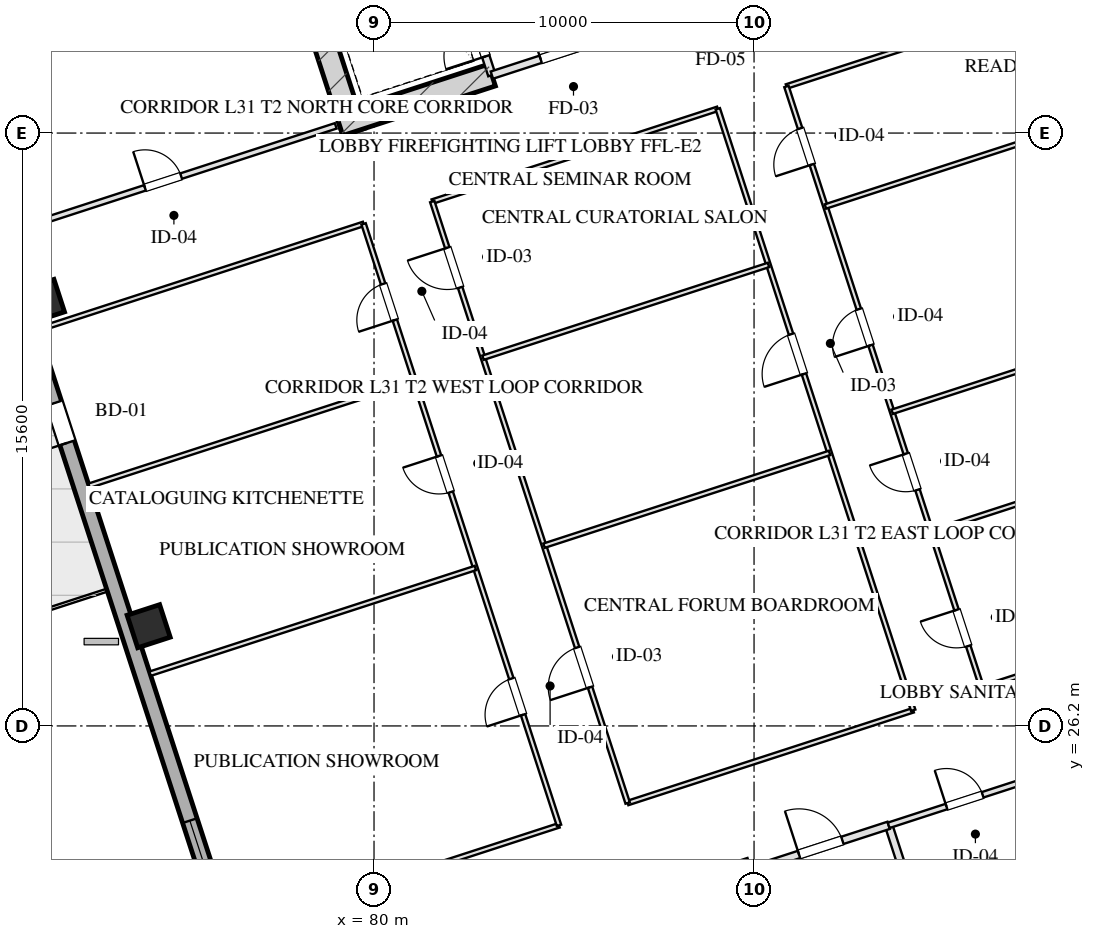
"""IFC4 building model, lengths in metres.
Left out: names, types, materials, properties, quantities, classifications, styles, units other than length and angle.
Written with IfcOpenShell. Run it as: python <this file> out.ifc"""

import sys

from ifc_helpers import new_model, si_unit, direction, frame, frame_2d, origin, origin_2d, place, context, subcontext, project, spatial, rectangle, hollow_rectangle, extrude, element, fill, save


model = new_model("IFC4")
c1 = context("Model", 3, precision=1e-05, world=origin(), true_north=direction((0.0, 1.0)))
c2 = subcontext(c1, "Body", "Model", "MODEL_VIEW")
j1 = project(units=[si_unit("LENGTHUNIT", "METRE"), si_unit("PLANEANGLEUNIT", "RADIAN")], contexts=[c1])
p1 = place(None, origin())
s1 = spatial("IfcSite", under=j1, at=p1, CompositionType="ELEMENT")
p2 = place(p1, origin())
s2 = spatial("IfcBuilding", under=s1, at=p2, CompositionType="ELEMENT")
p3 = place(p2, frame((0.0, 0.0, 120.75)))
s3 = spatial("IfcBuildingStorey", under=s2, at=p3, CompositionType="ELEMENT", Elevation=120.75)
p4 = place(p3, frame((85.886, 21.097, 0.0), z_axis=(0.0, 0.0, 1.0), x_axis=(0.951068073652, 0.308981422225, 0.0)))
e1 = element("IfcWall", 1, at=p4, inside=s3, PredefinedType="SHEAR", context=c2, shape_type="SweptSolid", body=[
    extrude(rectangle(XDim=4.22, YDim=0.6, at=frame_2d((2.11, 0.0))), origin(), (0.0, 0.0, 1.0), 3.45),
])
p5 = place(p3, frame((79.466, 41.828, 0.0), z_axis=(0.0, 0.0, 1.0), x_axis=(-0.309041232772, 0.951048640421, 0.0)))
e2 = element("IfcWall", 2, at=p5, inside=s3, PredefinedType="SHEAR", context=c2, shape_type="SweptSolid", body=[
    extrude(rectangle(XDim=9.48, YDim=0.6, at=frame_2d((4.74, 0.0))), origin(), (0.0, 0.0, 1.0), 3.45),
])
p6 = place(p3, frame((79.087, 42.021, 0.0), z_axis=(0.0, 0.0, 1.0), x_axis=(0.951062550203, 0.3089984233, 0.0)))
e3 = element("IfcWall", 3, at=p6, inside=s3, PredefinedType="SHEAR", context=c2, shape_type="SweptSolid", body=[
    extrude(rectangle(XDim=4.22, YDim=0.6, at=frame_2d((2.11, 0.0))), origin(), (0.0, 0.0, 1.0), 3.45),
])
for number, where, z_axis, x_axis in (
    (4, (74.07, 28.824, 0.0), (0.0, 0.0, 1.0), (0.951, 0.309, 0.0)),
    (5, (71.289, 37.384, 0.0), (0.0, 0.0, 1.0), (0.951, 0.309, 0.0)),
):
    element("IfcColumn", number, at=place(p3, frame(where, z_axis=z_axis, x_axis=x_axis)), inside=s3, PredefinedType="COLUMN", context=c2, shape_type="SweptSolid", body=[
        extrude(hollow_rectangle(XDim=0.9, YDim=0.9, WallThickness=0.032, at=origin_2d()), origin(), (0.0, 0.0, 1.0), 3.451),
    ])
p7 = place(p3, frame((80.716, 6.59, 0.0), z_axis=(0.0, 0.0, 1.0), x_axis=(-0.309017542002, 0.95105633836, 0.0)))
e6 = element("IfcWall", 6, at=p7, inside=s3, PredefinedType="SOLIDWALL", context=c2, shape_type="SweptSolid", body=[
    extrude(rectangle(XDim=46.4, YDim=0.4, at=frame_2d((23.2, 0.0))), origin(), (0.0, 0.0, 1.0), 2.61),
])
p8 = place(p7, frame((15.6, 0.0, 0.75)))
e7 = element("IfcOpeningElement", 7, at=p8, cuts=e6, PredefinedType="OPENING", context=c2, shape_type="SweptSolid", body=[
    extrude(rectangle(XDim=2.4, YDim=1.46, at=frame_2d((1.2, 0.73))), frame((0.0, 0.21, 0.0), z_axis=(0.0, -1.0, 0.0), x_axis=(1.0, 0.0, 0.0)), (0.0, 0.0, 1.0), 0.42),
])
p9 = place(p7, frame((28.45, 0.0, 0.0)))
e8 = element("IfcOpeningElement", 8, at=p9, cuts=e6, PredefinedType="OPENING", context=c2, shape_type="SweptSolid", body=[
    extrude(rectangle(XDim=1.1, YDim=2.15, at=frame_2d((0.55, 1.075))), frame((0.0, 0.21, 0.0), z_axis=(0.0, -1.0, 0.0), x_axis=(1.0, 0.0, 0.0)), (0.0, 0.0, 1.0), 0.42),
])
p10 = place(p3, frame((93.542, 23.585, 0.0), z_axis=(0.0, 0.0, 1.0), x_axis=(0.309042196757, -0.951048327176, 0.0)))
e9 = element("IfcWall", 9, at=p10, inside=s3, PredefinedType="PARTITIONING", context=c2, shape_type="SweptSolid", body=[
    extrude(rectangle(XDim=8.43, YDim=0.2, at=frame_2d((4.215, 0.0))), origin(), (0.0, 0.0, 1.0), 3.175),
])
p11 = place(p3, frame((89.899, 22.401, 0.0), z_axis=(0.0, 0.0, 1.0), x_axis=(0.951046716504, 0.309047153403, 0.0)))
e10 = element("IfcWall", 10, at=p11, inside=s3, PredefinedType="PARTITIONING", context=c2, shape_type="SweptSolid", body=[
    extrude(rectangle(XDim=3.83, YDim=0.2, at=frame_2d((1.915, 0.0))), origin(), (0.0, 0.0, 1.0), 3.175),
])
p12 = place(p11, frame((1.35, 0.0, 0.0)))
e11 = element("IfcOpeningElement", 11, at=p12, cuts=e10, PredefinedType="OPENING", context=c2, shape_type="SweptSolid", body=[
    extrude(rectangle(XDim=1.2, YDim=2.05, at=frame_2d((0.6, 1.025))), frame((0.0, 0.11, 0.0), z_axis=(0.0, -1.0, 0.0), x_axis=(1.0, 0.0, 0.0)), (0.0, 0.0, 1.0), 0.22),
])
p13 = place(p3, frame((93.542, 23.585, 0.0), z_axis=(0.0, 0.0, 1.0), x_axis=(0.951063829732, 0.308994485023, 0.0)))
e12 = element("IfcWall", 12, at=p13, inside=s3, PredefinedType="PARTITIONING", context=c2, shape_type="SweptSolid", body=[
    extrude(rectangle(XDim=4.4, YDim=0.15, at=frame_2d((2.2, 0.0))), origin(), (0.0, 0.0, 1.0), 3.175),
])
p14 = place(p13, frame((1.6, 0.0, 0.0)))
e13 = element("IfcOpeningElement", 13, at=p14, cuts=e12, PredefinedType="OPENING", context=c2, shape_type="SweptSolid", body=[
    extrude(rectangle(XDim=1.0, YDim=2.05, at=frame_2d((0.5, 1.025))), frame((0.0, 0.085, 0.0), z_axis=(0.0, -1.0, 0.0), x_axis=(1.0, 0.0, 0.0)), (0.0, 0.0, 1.0), 0.17),
])
p15 = place(p3, frame((83.101, 43.324, 0.0), z_axis=(0.0, 0.0, 1.0), x_axis=(-0.309048298632, 0.951046344356, 0.0)))
e14 = element("IfcWall", 14, at=p15, inside=s3, PredefinedType="PARTITIONING", context=c2, shape_type="SweptSolid", body=[
    extrude(rectangle(XDim=1.9, YDim=0.2, at=frame_2d((0.95, 0.0))), origin(), (0.0, 0.0, 1.0), 3.175),
])
p16 = place(p15, frame((0.52, 0.0, 0.0)))
e15 = element("IfcOpeningElement", 15, at=p16, cuts=e14, PredefinedType="OPENING", context=c2, shape_type="SweptSolid", body=[
    extrude(rectangle(XDim=1.1, YDim=2.05, at=frame_2d((0.55, 1.025))), frame((0.0, 0.11, 0.0), z_axis=(0.0, -1.0, 0.0), x_axis=(1.0, 0.0, 0.0)), (0.0, 0.0, 1.0), 0.22),
])
p17 = place(p3, frame((83.101, 43.324, 0.0), z_axis=(0.0, 0.0, 1.0), x_axis=(0.951052804469, 0.309028417967, 0.0)))
e16 = element("IfcWall", 16, at=p17, inside=s3, PredefinedType="PARTITIONING", context=c2, shape_type="SweptSolid", body=[
    extrude(rectangle(XDim=3.83, YDim=0.2, at=frame_2d((1.915, 0.0))), origin(), (0.0, 0.0, 1.0), 3.175),
])
p18 = place(p17, frame((1.35, 0.0, 0.0)))
e17 = element("IfcOpeningElement", 17, at=p18, cuts=e16, PredefinedType="OPENING", context=c2, shape_type="SweptSolid", body=[
    extrude(rectangle(XDim=1.2, YDim=2.05, at=frame_2d((0.6, 1.025))), frame((0.0, 0.11, 0.0), z_axis=(0.0, -1.0, 0.0), x_axis=(1.0, 0.0, 0.0)), (0.0, 0.0, 1.0), 0.22),
])
p19 = place(p3, frame((70.338, 39.177, 0.0), z_axis=(0.0, 0.0, 1.0), x_axis=(0.951059695568, 0.309007209409, 0.0)))
e18 = element("IfcWall", 18, at=p19, inside=s3, PredefinedType="PARTITIONING", context=c2, shape_type="SweptSolid", body=[
    extrude(rectangle(XDim=9.1, YDim=0.15, at=frame_2d((4.55, 0.0))), origin(), (0.0, 0.0, 1.0), 3.175),
])
p20 = place(p19, frame((3.822, 0.0, 0.0)))
e19 = element("IfcOpeningElement", 19, at=p20, cuts=e18, PredefinedType="OPENING", context=c2, shape_type="SweptSolid", body=[
    extrude(rectangle(XDim=1.0, YDim=2.05, at=frame_2d((0.5, 1.025))), frame((0.0, 0.085, 0.0), z_axis=(0.0, -1.0, 0.0), x_axis=(1.0, 0.0, 0.0)), (0.0, 0.0, 1.0), 0.17),
])
p21 = place(p3, frame((76.308, 20.803, 0.0), z_axis=(0.0, 0.0, 1.0), x_axis=(0.951054001411, 0.309024734286, 0.0)))
e20 = element("IfcWall", 20, at=p21, inside=s3, PredefinedType="PARTITIONING", context=c2, shape_type="SweptSolid", body=[
    extrude(rectangle(XDim=9.0, YDim=0.12, at=frame_2d((4.5, 0.0))), origin(), (0.0, 0.0, 1.0), 3.175),
])
p22 = place(p3, frame((86.675, 24.171, 0.0), z_axis=(0.0, 0.0, 1.0), x_axis=(0.951057231385, 0.309014793547, 0.0)))
e21 = element("IfcWall", 21, at=p22, inside=s3, PredefinedType="PARTITIONING", context=c2, shape_type="SweptSolid", body=[
    extrude(rectangle(XDim=7.9, YDim=0.12, at=frame_2d((3.95, 0.0))), origin(), (0.0, 0.0, 1.0), 3.175),
])
p23 = place(p3, frame((95.995, 27.2, 0.0), z_axis=(0.0, 0.0, 1.0), x_axis=(0.951057589409, 0.309013691651, 0.0)))
e22 = element("IfcWall", 22, at=p23, inside=s3, PredefinedType="PARTITIONING", context=c2, shape_type="SweptSolid", body=[
    extrude(rectangle(XDim=13.5, YDim=0.12, at=frame_2d((6.75, 0.0))), origin(), (0.0, 0.0, 1.0), 3.175),
])
p24 = place(p3, frame((71.166, 36.629, 0.0), z_axis=(0.0, 0.0, 1.0), x_axis=(0.951059383421, 0.309008170129, 0.0)))
e23 = element("IfcWall", 23, at=p24, inside=s3, PredefinedType="PARTITIONING", context=c2, shape_type="SweptSolid", body=[
    extrude(rectangle(XDim=9.0, YDim=0.12, at=frame_2d((4.5, 0.0))), origin(), (0.0, 0.0, 1.0), 3.175),
])
p25 = place(p3, frame((81.532, 39.997, 0.0), z_axis=(0.0, 0.0, 1.0), x_axis=(0.951048148493, 0.309042746635, 0.0)))
e24 = element("IfcWall", 24, at=p25, inside=s3, PredefinedType="PARTITIONING", context=c2, shape_type="SweptSolid", body=[
    extrude(rectangle(XDim=7.9, YDim=0.12, at=frame_2d((3.95, 0.0))), origin(), (0.0, 0.0, 1.0), 3.175),
])
p26 = place(p3, frame((90.853, 43.025, 0.0), z_axis=(0.0, 0.0, 1.0), x_axis=(0.951054001411, 0.309024734286, 0.0)))
e25 = element("IfcWall", 25, at=p26, inside=s3, PredefinedType="PARTITIONING", context=c2, shape_type="SweptSolid", body=[
    extrude(rectangle(XDim=13.5, YDim=0.12, at=frame_2d((6.75, 0.0))), origin(), (0.0, 0.0, 1.0), 3.175),
])
p27 = place(p3, frame((84.867, 23.584, 0.0), z_axis=(0.0, 0.0, 1.0), x_axis=(-0.309022042254, 0.951054876125, 0.0)))
e26 = element("IfcWall", 26, at=p27, inside=s3, PredefinedType="PARTITIONING", context=c2, shape_type="SweptSolid", body=[
    extrude(rectangle(XDim=16.64, YDim=0.12, at=frame_2d((8.32, 0.0))), origin(), (0.0, 0.0, 1.0), 3.175),
])
p28 = place(p27, frame((3.06, 0.0, 0.0)))
e27 = element("IfcOpeningElement", 27, at=p28, cuts=e26, PredefinedType="OPENING", context=c2, shape_type="SweptSolid", body=[
    extrude(rectangle(XDim=1.0, YDim=2.05, at=frame_2d((0.5, 1.025))), frame((0.0, 0.07, 0.0), z_axis=(0.0, -1.0, 0.0), x_axis=(1.0, 0.0, 0.0)), (0.0, 0.0, 1.0), 0.14),
])
p29 = place(p27, frame((9.22, 0.0, 0.0)))
e28 = element("IfcOpeningElement", 28, at=p29, cuts=e26, PredefinedType="OPENING", context=c2, shape_type="SweptSolid", body=[
    extrude(rectangle(XDim=1.0, YDim=2.05, at=frame_2d((0.5, 1.025))), frame((0.0, 0.07, 0.0), z_axis=(0.0, -1.0, 0.0), x_axis=(1.0, 0.0, 0.0)), (0.0, 0.0, 1.0), 0.14),
])
p30 = place(p27, frame((13.98, 0.0, 0.0)))
e29 = element("IfcOpeningElement", 29, at=p30, cuts=e26, PredefinedType="OPENING", context=c2, shape_type="SweptSolid", body=[
    extrude(rectangle(XDim=1.0, YDim=2.05, at=frame_2d((0.5, 1.025))), frame((0.0, 0.07, 0.0), z_axis=(0.0, -1.0, 0.0), x_axis=(1.0, 0.0, 0.0)), (0.0, 0.0, 1.0), 0.14),
])
p31 = place(p3, frame((86.675, 24.171, 0.0), z_axis=(0.0, 0.0, 1.0), x_axis=(-0.309022042254, 0.951054876125, 0.0)))
e30 = element("IfcWall", 30, at=p31, inside=s3, PredefinedType="PARTITIONING", context=c2, shape_type="SweptSolid", body=[
    extrude(rectangle(XDim=16.64, YDim=0.12, at=frame_2d((8.32, 0.0))), origin(), (0.0, 0.0, 1.0), 3.175),
])
p32 = place(p31, frame((3.204, 0.0, 0.0)))
e31 = element("IfcOpeningElement", 31, at=p32, cuts=e30, PredefinedType="OPENING", context=c2, shape_type="SweptSolid", body=[
    extrude(rectangle(XDim=1.1, YDim=2.05, at=frame_2d((0.55, 1.025))), frame((0.0, 0.07, 0.0), z_axis=(0.0, -1.0, 0.0), x_axis=(1.0, 0.0, 0.0)), (0.0, 0.0, 1.0), 0.14),
])
p33 = place(p31, frame((14.264, 0.0, 0.0)))
e32 = element("IfcOpeningElement", 32, at=p33, cuts=e30, PredefinedType="OPENING", context=c2, shape_type="SweptSolid", body=[
    extrude(rectangle(XDim=1.1, YDim=2.05, at=frame_2d((0.55, 1.025))), frame((0.0, 0.07, 0.0), z_axis=(0.0, -1.0, 0.0), x_axis=(1.0, 0.0, 0.0)), (0.0, 0.0, 1.0), 0.14),
])
p34 = place(p3, frame((94.188, 26.613, 0.0), z_axis=(0.0, 0.0, 1.0), x_axis=(-0.30901773025, 0.951056277195, 0.0)))
e33 = element("IfcWall", 33, at=p34, inside=s3, PredefinedType="PARTITIONING", context=c2, shape_type="SweptSolid", body=[
    extrude(rectangle(XDim=16.64, YDim=0.12, at=frame_2d((8.32, 0.0))), origin(), (0.0, 0.0, 1.0), 3.175),
])
p35 = place(p34, frame((9.304, 0.0, 0.0)))
e34 = element("IfcOpeningElement", 34, at=p35, cuts=e33, PredefinedType="OPENING", context=c2, shape_type="SweptSolid", body=[
    extrude(rectangle(XDim=1.1, YDim=2.05, at=frame_2d((0.55, 1.025))), frame((0.0, 0.07, 0.0), z_axis=(0.0, -1.0, 0.0), x_axis=(1.0, 0.0, 0.0)), (0.0, 0.0, 1.0), 0.14),
])
p36 = place(p3, frame((95.995, 27.2, 0.0), z_axis=(0.0, 0.0, 1.0), x_axis=(-0.309022042254, 0.951054876125, 0.0)))
e35 = element("IfcWall", 35, at=p36, inside=s3, PredefinedType="PARTITIONING", context=c2, shape_type="SweptSolid", body=[
    extrude(rectangle(XDim=16.64, YDim=0.12, at=frame_2d((8.32, 0.0))), origin(), (0.0, 0.0, 1.0), 3.175),
])
p37 = place(p36, frame((1.16, 0.0, 0.0)))
e36 = element("IfcOpeningElement", 36, at=p37, cuts=e35, PredefinedType="OPENING", context=c2, shape_type="SweptSolid", body=[
    extrude(rectangle(XDim=1.0, YDim=2.05, at=frame_2d((0.5, 1.025))), frame((0.0, 0.07, 0.0), z_axis=(0.0, -1.0, 0.0), x_axis=(1.0, 0.0, 0.0)), (0.0, 0.0, 1.0), 0.14),
])
p38 = place(p36, frame((5.48, 0.0, 0.0)))
e37 = element("IfcOpeningElement", 37, at=p38, cuts=e35, PredefinedType="OPENING", context=c2, shape_type="SweptSolid", body=[
    extrude(rectangle(XDim=1.0, YDim=2.05, at=frame_2d((0.5, 1.025))), frame((0.0, 0.07, 0.0), z_axis=(0.0, -1.0, 0.0), x_axis=(1.0, 0.0, 0.0)), (0.0, 0.0, 1.0), 0.14),
])
p39 = place(p36, frame((9.48, 0.0, 0.0)))
e38 = element("IfcOpeningElement", 38, at=p39, cuts=e35, PredefinedType="OPENING", context=c2, shape_type="SweptSolid", body=[
    extrude(rectangle(XDim=1.0, YDim=2.05, at=frame_2d((0.5, 1.025))), frame((0.0, 0.07, 0.0), z_axis=(0.0, -1.0, 0.0), x_axis=(1.0, 0.0, 0.0)), (0.0, 0.0, 1.0), 0.14),
])
p40 = place(p36, frame((14.48, 0.0, 0.0)))
e39 = element("IfcOpeningElement", 39, at=p40, cuts=e35, PredefinedType="OPENING", context=c2, shape_type="SweptSolid", body=[
    extrude(rectangle(XDim=1.0, YDim=2.05, at=frame_2d((0.5, 1.025))), frame((0.0, 0.07, 0.0), z_axis=(0.0, -1.0, 0.0), x_axis=(1.0, 0.0, 0.0)), (0.0, 0.0, 1.0), 0.14),
])
for number, where, z_axis, x_axis in (
    (40, (84.474, 30.943, 0.0), (0.0, 0.0, 1.0), (0.951, 0.309, 0.0)),
    (41, (82.867, 35.888, 0.0), (0.0, 0.0, 1.0), (0.951, 0.309, 0.0)),
):
    element("IfcWall", number, at=place(p3, frame(where, z_axis=z_axis, x_axis=x_axis)), inside=s3, PredefinedType="PARTITIONING", context=c2, shape_type="SweptSolid", body=[
        extrude(rectangle(XDim=7.9, YDim=0.12, at=frame_2d((3.95, 0.0))), origin(), (0.0, 0.0, 1.0), 3.175),
    ])
p41 = place(p3, frame((74.108, 27.574, 0.0), z_axis=(0.0, 0.0, 1.0), x_axis=(0.951054001411, 0.309024734286, 0.0)))
e42 = element("IfcWall", 42, at=p41, inside=s3, PredefinedType="PARTITIONING", context=c2, shape_type="SweptSolid", body=[
    extrude(rectangle(XDim=9.0, YDim=0.12, at=frame_2d((4.5, 0.0))), origin(), (0.0, 0.0, 1.0), 3.175),
])
p42 = place(p3, frame((72.501, 32.52, 0.0), z_axis=(0.0, 0.0, 1.0), x_axis=(0.951051410833, 0.309032706929, 0.0)))
e43 = element("IfcWall", 43, at=p42, inside=s3, PredefinedType="PARTITIONING", context=c2, shape_type="SweptSolid", body=[
    extrude(rectangle(XDim=9.0, YDim=0.12, at=frame_2d((4.5, 0.0))), origin(), (0.0, 0.0, 1.0), 3.175),
])
for number, where, z_axis, x_axis in (
    (44, (94.66, 31.308, 0.0), (0.0, 0.0, 1.0), (0.951, 0.309, 0.0)),
    (45, (93.634, 34.466, 0.0), (0.0, 0.0, 1.0), (0.951, 0.309, 0.0)),
):
    element("IfcWall", number, at=place(p3, frame(where, z_axis=z_axis, x_axis=x_axis)), inside=s3, PredefinedType="PARTITIONING", context=c2, shape_type="SweptSolid", body=[
        extrude(rectangle(XDim=13.5, YDim=0.12, at=frame_2d((6.75, 0.0))), origin(), (0.0, 0.0, 1.0), 3.175),
    ])
p43 = place(p3, frame((91.879, 39.868, 0.0), z_axis=(0.0, 0.0, 1.0), x_axis=(0.951054001411, 0.309024734286, 0.0)))
e46 = element("IfcWall", 46, at=p43, inside=s3, PredefinedType="PARTITIONING", context=c2, shape_type="SweptSolid", body=[
    extrude(rectangle(XDim=13.5, YDim=0.12, at=frame_2d((6.75, 0.0))), origin(), (0.0, 0.0, 1.0), 3.175),
])
p44 = place(p8, origin())
e47 = element("IfcWindow", 47, at=p44, inside=s3, PartitioningType="TRIPLE_PANEL_VERTICAL", PredefinedType="WINDOW", context=c2, shape_type="SweptSolid", body=[
    extrude(rectangle(XDim=2.4, YDim=1.46, at=frame_2d((1.2, 0.73))), frame((0.0, 0.03, 0.0), z_axis=(0.0, -1.0, 0.0), x_axis=(1.0, 0.0, 0.0)), (0.0, 0.0, 1.0), 0.06),
])
fill(e7, e47)
p45 = place(p9, origin())
e48 = element("IfcDoor", 48, at=p45, inside=s3, OperationType="SINGLE_SWING_LEFT", PredefinedType="DOOR", context=c2, shape_type="SweptSolid", body=[
    extrude(rectangle(XDim=1.1, YDim=2.15, at=frame_2d((0.55, 1.075))), frame((0.0, 0.025, 0.0), z_axis=(0.0, -1.0, 0.0), x_axis=(1.0, 0.0, 0.0)), (0.0, 0.0, 1.0), 0.05),
])
fill(e8, e48)
p46 = place(p12, origin())
e49 = element("IfcDoor", 49, at=p46, inside=s3, OperationType="SINGLE_SWING_LEFT", PredefinedType="DOOR", context=c2, shape_type="SweptSolid", body=[
    extrude(rectangle(XDim=1.2, YDim=2.05, at=frame_2d((0.6, 1.025))), frame((0.0, 0.025, 0.0), z_axis=(0.0, -1.0, 0.0), x_axis=(1.0, 0.0, 0.0)), (0.0, 0.0, 1.0), 0.05),
])
fill(e11, e49)
p47 = place(p14, origin())
e50 = element("IfcDoor", 50, at=p47, inside=s3, OperationType="SINGLE_SWING_LEFT", PredefinedType="DOOR", context=c2, shape_type="SweptSolid", body=[
    extrude(rectangle(XDim=1.0, YDim=2.05, at=frame_2d((0.5, 1.025))), frame((0.0, 0.025, 0.0), z_axis=(0.0, -1.0, 0.0), x_axis=(1.0, 0.0, 0.0)), (0.0, 0.0, 1.0), 0.05),
])
fill(e13, e50)
p48 = place(p16, origin())
e51 = element("IfcDoor", 51, at=p48, inside=s3, OperationType="SINGLE_SWING_LEFT", PredefinedType="DOOR", context=c2, shape_type="SweptSolid", body=[
    extrude(rectangle(XDim=1.1, YDim=2.05, at=frame_2d((0.55, 1.025))), frame((0.0, 0.025, 0.0), z_axis=(0.0, -1.0, 0.0), x_axis=(1.0, 0.0, 0.0)), (0.0, 0.0, 1.0), 0.05),
])
fill(e15, e51)
p49 = place(p18, origin())
e52 = element("IfcDoor", 52, at=p49, inside=s3, OperationType="SINGLE_SWING_LEFT", PredefinedType="DOOR", context=c2, shape_type="SweptSolid", body=[
    extrude(rectangle(XDim=1.2, YDim=2.05, at=frame_2d((0.6, 1.025))), frame((0.0, 0.025, 0.0), z_axis=(0.0, -1.0, 0.0), x_axis=(1.0, 0.0, 0.0)), (0.0, 0.0, 1.0), 0.05),
])
fill(e17, e52)
p50 = place(p20, origin())
e53 = element("IfcDoor", 53, at=p50, inside=s3, OperationType="SINGLE_SWING_LEFT", PredefinedType="DOOR", context=c2, shape_type="SweptSolid", body=[
    extrude(rectangle(XDim=1.0, YDim=2.05, at=frame_2d((0.5, 1.025))), frame((0.0, 0.025, 0.0), z_axis=(0.0, -1.0, 0.0), x_axis=(1.0, 0.0, 0.0)), (0.0, 0.0, 1.0), 0.05),
])
fill(e19, e53)
p51 = place(p28, origin())
e54 = element("IfcDoor", 54, at=p51, inside=s3, OperationType="SINGLE_SWING_LEFT", PredefinedType="DOOR", context=c2, shape_type="SweptSolid", body=[
    extrude(rectangle(XDim=1.0, YDim=2.05, at=frame_2d((0.5, 1.025))), frame((0.0, 0.025, 0.0), z_axis=(0.0, -1.0, 0.0), x_axis=(1.0, 0.0, 0.0)), (0.0, 0.0, 1.0), 0.05),
])
fill(e27, e54)
p52 = place(p29, origin())
e55 = element("IfcDoor", 55, at=p52, inside=s3, OperationType="SINGLE_SWING_RIGHT", PredefinedType="DOOR", context=c2, shape_type="SweptSolid", body=[
    extrude(rectangle(XDim=1.0, YDim=2.05, at=frame_2d((0.5, 1.025))), frame((0.0, 0.025, 0.0), z_axis=(0.0, -1.0, 0.0), x_axis=(1.0, 0.0, 0.0)), (0.0, 0.0, 1.0), 0.05),
])
fill(e28, e55)
p53 = place(p30, origin())
e56 = element("IfcDoor", 56, at=p53, inside=s3, OperationType="SINGLE_SWING_LEFT", PredefinedType="DOOR", context=c2, shape_type="SweptSolid", body=[
    extrude(rectangle(XDim=1.0, YDim=2.05, at=frame_2d((0.5, 1.025))), frame((0.0, 0.025, 0.0), z_axis=(0.0, -1.0, 0.0), x_axis=(1.0, 0.0, 0.0)), (0.0, 0.0, 1.0), 0.05),
])
fill(e29, e56)
p54 = place(p32, origin())
e57 = element("IfcDoor", 57, at=p54, inside=s3, OperationType="SINGLE_SWING_LEFT", PredefinedType="DOOR", context=c2, shape_type="SweptSolid", body=[
    extrude(rectangle(XDim=1.1, YDim=2.05, at=frame_2d((0.55, 1.025))), frame((0.0, 0.025, 0.0), z_axis=(0.0, -1.0, 0.0), x_axis=(1.0, 0.0, 0.0)), (0.0, 0.0, 1.0), 0.05),
])
fill(e31, e57)
p55 = place(p33, origin())
e58 = element("IfcDoor", 58, at=p55, inside=s3, OperationType="SINGLE_SWING_RIGHT", PredefinedType="DOOR", context=c2, shape_type="SweptSolid", body=[
    extrude(rectangle(XDim=1.1, YDim=2.05, at=frame_2d((0.55, 1.025))), frame((0.0, 0.025, 0.0), z_axis=(0.0, -1.0, 0.0), x_axis=(1.0, 0.0, 0.0)), (0.0, 0.0, 1.0), 0.05),
])
fill(e32, e58)
p56 = place(p35, origin())
e59 = element("IfcDoor", 59, at=p56, inside=s3, OperationType="SINGLE_SWING_LEFT", PredefinedType="DOOR", context=c2, shape_type="SweptSolid", body=[
    extrude(rectangle(XDim=1.1, YDim=2.05, at=frame_2d((0.55, 1.025))), frame((0.0, 0.025, 0.0), z_axis=(0.0, -1.0, 0.0), x_axis=(1.0, 0.0, 0.0)), (0.0, 0.0, 1.0), 0.05),
])
fill(e34, e59)
p57 = place(p37, origin())
e60 = element("IfcDoor", 60, at=p57, inside=s3, OperationType="SINGLE_SWING_RIGHT", PredefinedType="DOOR", context=c2, shape_type="SweptSolid", body=[
    extrude(rectangle(XDim=1.0, YDim=2.05, at=frame_2d((0.5, 1.025))), frame((0.0, 0.025, 0.0), z_axis=(0.0, -1.0, 0.0), x_axis=(1.0, 0.0, 0.0)), (0.0, 0.0, 1.0), 0.05),
])
fill(e36, e60)
p58 = place(p38, origin())
e61 = element("IfcDoor", 61, at=p58, inside=s3, OperationType="SINGLE_SWING_RIGHT", PredefinedType="DOOR", context=c2, shape_type="SweptSolid", body=[
    extrude(rectangle(XDim=1.0, YDim=2.05, at=frame_2d((0.5, 1.025))), frame((0.0, 0.025, 0.0), z_axis=(0.0, -1.0, 0.0), x_axis=(1.0, 0.0, 0.0)), (0.0, 0.0, 1.0), 0.05),
])
fill(e37, e61)
p59 = place(p39, origin())
e62 = element("IfcDoor", 62, at=p59, inside=s3, OperationType="SINGLE_SWING_LEFT", PredefinedType="DOOR", context=c2, shape_type="SweptSolid", body=[
    extrude(rectangle(XDim=1.0, YDim=2.05, at=frame_2d((0.5, 1.025))), frame((0.0, 0.025, 0.0), z_axis=(0.0, -1.0, 0.0), x_axis=(1.0, 0.0, 0.0)), (0.0, 0.0, 1.0), 0.05),
])
fill(e38, e62)
p60 = place(p40, origin())
e63 = element("IfcDoor", 63, at=p60, inside=s3, OperationType="SINGLE_SWING_LEFT", PredefinedType="DOOR", context=c2, shape_type="SweptSolid", body=[
    extrude(rectangle(XDim=1.0, YDim=2.05, at=frame_2d((0.5, 1.025))), frame((0.0, 0.025, 0.0), z_axis=(0.0, -1.0, 0.0), x_axis=(1.0, 0.0, 0.0)), (0.0, 0.0, 1.0), 0.05),
])
fill(e39, e63)
save(model, sys.argv[1])
